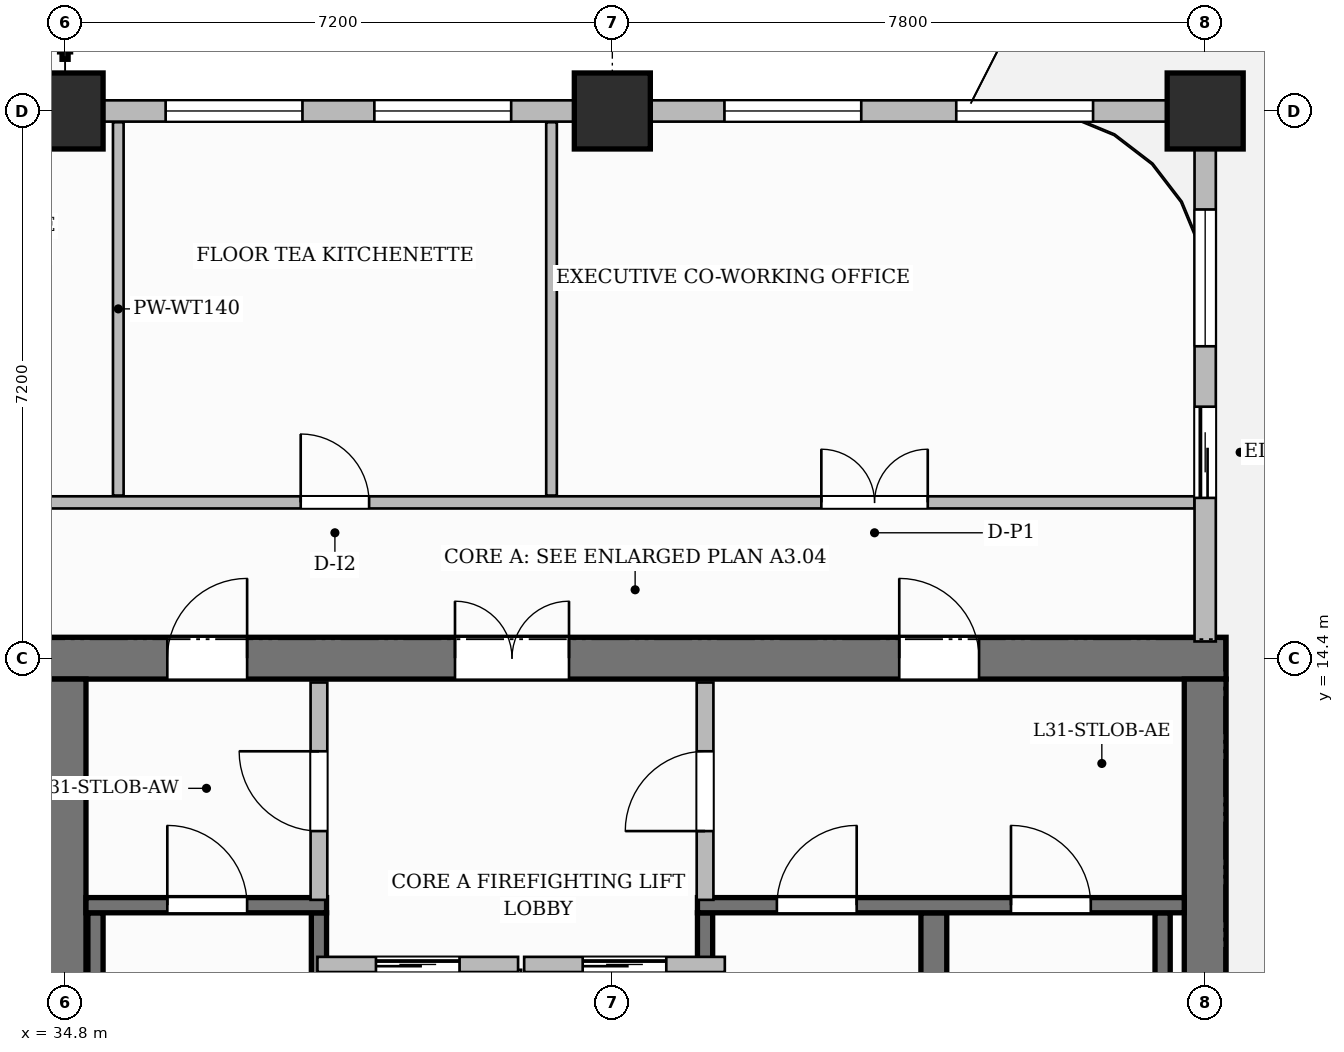
"""IFC4 building model, lengths in metres.
Left out: names, types, materials, properties, quantities, classifications, styles, units other than length and angle.
Written with IfcOpenShell. Run it as: python <this file> out.ifc"""

import sys

from ifc_helpers import new_model, si_unit, direction, frame, frame_2d, origin, origin_2d, place, context, subcontext, project, spatial, rectangle, extrude, source, transform, mapped, element, fill, save


model = new_model("IFC4")
c1 = context("Model", 3, precision=1e-05, world=origin(), true_north=direction((0.0, 1.0)))
c2 = subcontext(c1, "Body", "Model", "MODEL_VIEW")
j1 = project(units=[si_unit("LENGTHUNIT", "METRE"), si_unit("PLANEANGLEUNIT", "RADIAN")], contexts=[c1])
p1 = place(None, origin())
s1 = spatial("IfcSite", under=j1, at=p1, CompositionType="ELEMENT")
p2 = place(p1, origin())
s2 = spatial("IfcBuilding", under=s1, at=p2, CompositionType="ELEMENT")
p3 = place(p2, frame((0.0, 0.0, 126.6)))
s3 = spatial("IfcBuildingStorey", under=s2, at=p3, CompositionType="ELEMENT", Elevation=126.6)
p4 = place(p3, frame((34.525, 14.4, 0.0), z_axis=(0.0, 0.0, 1.0), x_axis=(1.0, 0.0, 0.0)))
e1 = element("IfcWall", 1, at=p4, inside=s3, PredefinedType="SHEAR", context=c2, shape_type="SweptSolid", body=[
    extrude(rectangle(XDim=15.55, YDim=0.55, at=frame_2d((7.775, 0.0))), origin(), (0.0, 0.0, 1.0), 3.7),
])
p5 = place(p4, frame((5.405, 0.0, 0.0)))
e2 = element("IfcOpeningElement", 2, at=p5, cuts=e1, PredefinedType="OPENING", context=c2, shape_type="SweptSolid", body=[
    extrude(rectangle(XDim=1.5, YDim=2.2, at=frame_2d((0.75, 1.1))), frame((0.0, 0.285, 0.0), z_axis=(0.0, -1.0, 0.0), x_axis=(1.0, 0.0, 0.0)), (0.0, 0.0, 1.0), 0.57),
])
p6 = place(p4, frame((1.62, 0.0, 0.0)))
e3 = element("IfcOpeningElement", 3, at=p6, cuts=e1, PredefinedType="OPENING", context=c2, shape_type="SweptSolid", body=[
    extrude(rectangle(XDim=1.05, YDim=2.15, at=frame_2d((0.525, 1.075))), frame((0.0, 0.285, 0.0), z_axis=(0.0, -1.0, 0.0), x_axis=(1.0, 0.0, 0.0)), (0.0, 0.0, 1.0), 0.57),
])
p7 = place(p4, frame((11.25, 0.0, 0.0)))
e4 = element("IfcOpeningElement", 4, at=p7, cuts=e1, PredefinedType="OPENING", context=c2, shape_type="SweptSolid", body=[
    extrude(rectangle(XDim=1.05, YDim=2.15, at=frame_2d((0.525, 1.075))), frame((0.0, 0.285, 0.0), z_axis=(0.0, -1.0, 0.0), x_axis=(1.0, 0.0, 0.0)), (0.0, 0.0, 1.0), 0.57),
])
for number, where, z_axis, x_axis in (
    (5, (34.8, 3.875, 0.0), (0.0, 0.0, 1.0), (0.0, 1.0, 0.0)),
    (6, (49.8, 3.875, 0.0), (0.0, 0.0, 1.0), (0.0, 1.0, 0.0)),
):
    element("IfcWall", number, at=place(p3, frame(where, z_axis=z_axis, x_axis=x_axis)), inside=s3, PredefinedType="SHEAR", context=c2, shape_type="SweptSolid", body=[
        extrude(rectangle(XDim=10.25, YDim=0.55, at=frame_2d((5.125, 0.0))), origin(), (0.0, 0.0, 1.0), 3.7),
    ])
m1 = source(origin(), c2, "Body", "SweptSolid", [
    extrude(rectangle(XDim=1.0, YDim=1.0, at=origin_2d()), origin(), (0.0, 0.0, 1.0), 3.7),
])
for number, where, z_axis, x_axis in (
    (7, (34.8, 21.6, 0.0), (0.0, 0.0, 1.0), (1.0, 0.0, 0.0)),
    (8, (42.0, 21.6, 0.0), (0.0, 0.0, 1.0), (1.0, 0.0, 0.0)),
    (9, (49.8, 21.6, 0.0), (0.0, 0.0, 1.0), (1.0, 0.0, 0.0)),
):
    element("IfcColumn", number, at=place(p3, frame(where, z_axis=z_axis, x_axis=x_axis)), inside=s3, PredefinedType="COLUMN", context=c2, shape_type="MappedRepresentation", body=[
        mapped(m1, transform((0.0, 0.0, 0.0), scale=1.0)),
    ])
for number, where, z_axis, x_axis in (
    (10, (35.2, 4.1, 0.0), (0.0, 0.0, 1.0), (0.0, 1.0, 0.0)),
    (11, (38.14, 4.1, 0.0), (0.0, 0.0, 1.0), (0.0, 1.0, 0.0)),
):
    element("IfcWall", number, at=place(p3, frame(where, z_axis=z_axis, x_axis=x_axis)), inside=s3, PredefinedType="SHEAR", context=c2, shape_type="SweptSolid", body=[
        extrude(rectangle(XDim=6.95, YDim=0.2, at=frame_2d((3.475, 0.0))), origin(), (0.0, 0.0, 1.0), 3.7),
    ])
p8 = place(p3, frame((35.075, 11.15, 0.0), z_axis=(0.0, 0.0, 1.0), x_axis=(1.0, 0.0, 0.0)))
e12 = element("IfcWall", 12, at=p8, inside=s3, PredefinedType="SHEAR", context=c2, shape_type="SweptSolid", body=[
    extrude(rectangle(XDim=3.165, YDim=0.2, at=frame_2d((1.583, 0.0))), origin(), (0.0, 0.0, 1.0), 3.7),
])
p9 = place(p8, frame((1.07, 0.0, 0.0)))
e13 = element("IfcOpeningElement", 13, at=p9, cuts=e12, PredefinedType="OPENING", context=c2, shape_type="SweptSolid", body=[
    extrude(rectangle(XDim=1.05, YDim=2.2, at=frame_2d((0.525, 1.1))), frame((0.0, 0.11, 0.0), z_axis=(0.0, -1.0, 0.0), x_axis=(1.0, 0.0, 0.0)), (0.0, 0.0, 1.0), 0.22),
])
p10 = place(p3, frame((43.22, 4.1, 0.0), z_axis=(0.0, 0.0, 1.0), x_axis=(0.0, 1.0, 0.0)))
e14 = element("IfcWall", 14, at=p10, inside=s3, PredefinedType="SHEAR", context=c2, shape_type="SweptSolid", body=[
    extrude(rectangle(XDim=6.95, YDim=0.2, at=frame_2d((3.475, 0.0))), origin(), (0.0, 0.0, 1.0), 3.7),
])
p11 = place(p3, frame((46.23, 4.1, 0.0), z_axis=(0.0, 0.0, 1.0), x_axis=(0.0, 1.0, 0.0)))
e15 = element("IfcWall", 15, at=p11, inside=s3, PredefinedType="SHEAR", context=c2, shape_type="SweptSolid", body=[
    extrude(rectangle(XDim=6.95, YDim=0.34, at=frame_2d((3.475, 0.0))), origin(), (0.0, 0.0, 1.0), 3.7),
])
p12 = place(p3, frame((49.24, 4.1, 0.0), z_axis=(0.0, 0.0, 1.0), x_axis=(0.0, 1.0, 0.0)))
e16 = element("IfcWall", 16, at=p12, inside=s3, PredefinedType="SHEAR", context=c2, shape_type="SweptSolid", body=[
    extrude(rectangle(XDim=6.95, YDim=0.2, at=frame_2d((3.475, 0.0))), origin(), (0.0, 0.0, 1.0), 3.7),
])
p13 = place(p3, frame((43.12, 11.15, 0.0), z_axis=(0.0, 0.0, 1.0), x_axis=(1.0, 0.0, 0.0)))
e17 = element("IfcWall", 17, at=p13, inside=s3, PredefinedType="SHEAR", context=c2, shape_type="SweptSolid", body=[
    extrude(rectangle(XDim=6.405, YDim=0.2, at=frame_2d((3.202, 0.0))), origin(), (0.0, 0.0, 1.0), 3.7),
])
p14 = place(p13, frame((1.045, 0.0, 0.0)))
e18 = element("IfcOpeningElement", 18, at=p14, cuts=e17, PredefinedType="OPENING", context=c2, shape_type="SweptSolid", body=[
    extrude(rectangle(XDim=1.05, YDim=2.2, at=frame_2d((0.525, 1.1))), frame((0.0, 0.11, 0.0), z_axis=(0.0, -1.0, 0.0), x_axis=(1.0, 0.0, 0.0)), (0.0, 0.0, 1.0), 0.22),
])
p15 = place(p13, frame((4.125, 0.0, 0.0)))
e19 = element("IfcOpeningElement", 19, at=p15, cuts=e17, PredefinedType="OPENING", context=c2, shape_type="SweptSolid", body=[
    extrude(rectangle(XDim=1.05, YDim=2.2, at=frame_2d((0.525, 1.1))), frame((0.0, 0.11, 0.0), z_axis=(0.0, -1.0, 0.0), x_axis=(1.0, 0.0, 0.0)), (0.0, 0.0, 1.0), 0.22),
])
p16 = place(p3, frame((40.7, 8.12, 0.0), z_axis=(0.0, 0.0, 1.0), x_axis=(0.0, 1.0, 0.0)))
e20 = element("IfcWall", 20, at=p16, inside=s3, PredefinedType="PARTITIONING", context=c2, shape_type="SweptSolid", body=[
    extrude(rectangle(XDim=2.18, YDim=0.2, at=frame_2d((1.09, 0.0))), origin(), (0.0, 0.0, 1.0), 3.45),
])
p17 = place(p3, frame((38.14, 11.22, 0.0), z_axis=(0.0, 0.0, 1.0), x_axis=(0.0, 1.0, 0.0)))
e21 = element("IfcWall", 21, at=p17, inside=s3, PredefinedType="PARTITIONING", context=c2, shape_type="SweptSolid", body=[
    extrude(rectangle(XDim=2.86, YDim=0.22, at=frame_2d((1.43, 0.0))), origin(), (0.0, 0.0, 1.0), 3.45),
])
p18 = place(p17, frame((0.905, 0.0, 0.0)))
e22 = element("IfcOpeningElement", 22, at=p18, cuts=e21, PredefinedType="OPENING", context=c2, shape_type="SweptSolid", body=[
    extrude(rectangle(XDim=1.05, YDim=2.15, at=frame_2d((0.525, 1.075))), frame((0.0, 0.12, 0.0), z_axis=(0.0, -1.0, 0.0), x_axis=(1.0, 0.0, 0.0)), (0.0, 0.0, 1.0), 0.24),
])
p19 = place(p3, frame((43.22, 11.22, 0.0), z_axis=(0.0, 0.0, 1.0), x_axis=(0.0, 1.0, 0.0)))
e23 = element("IfcWall", 23, at=p19, inside=s3, PredefinedType="PARTITIONING", context=c2, shape_type="SweptSolid", body=[
    extrude(rectangle(XDim=2.86, YDim=0.22, at=frame_2d((1.43, 0.0))), origin(), (0.0, 0.0, 1.0), 3.45),
])
p20 = place(p19, frame((0.905, 0.0, 0.0)))
e24 = element("IfcOpeningElement", 24, at=p20, cuts=e23, PredefinedType="OPENING", context=c2, shape_type="SweptSolid", body=[
    extrude(rectangle(XDim=1.05, YDim=2.15, at=frame_2d((0.525, 1.075))), frame((0.0, 0.12, 0.0), z_axis=(0.0, -1.0, 0.0), x_axis=(1.0, 0.0, 0.0)), (0.0, 0.0, 1.0), 0.24),
])
p21 = place(p3, frame((32.19, 16.45, 0.0), z_axis=(0.0, 0.0, 1.0), x_axis=(1.0, 0.0, 0.0)))
e25 = element("IfcWall", 25, at=p21, inside=s3, PredefinedType="PARTITIONING", context=c2, shape_type="SweptSolid", body=[
    extrude(rectangle(XDim=17.47, YDim=0.16, at=frame_2d((8.735, 0.0))), origin(), (0.0, 0.0, 1.0), 3.45),
])
p22 = place(p21, frame((1.185, 0.0, 0.0)))
e26 = element("IfcOpeningElement", 26, at=p22, cuts=e25, PredefinedType="OPENING", context=c2, shape_type="SweptSolid", body=[
    extrude(rectangle(XDim=0.85, YDim=2.1, at=frame_2d((0.425, 1.05))), frame((0.0, 0.09, 0.0), z_axis=(0.0, -1.0, 0.0), x_axis=(1.0, 0.0, 0.0)), (0.0, 0.0, 1.0), 0.18),
])
p23 = place(p21, frame((5.71, 0.0, 0.0)))
e27 = element("IfcOpeningElement", 27, at=p23, cuts=e25, PredefinedType="OPENING", context=c2, shape_type="SweptSolid", body=[
    extrude(rectangle(XDim=0.9, YDim=2.15, at=frame_2d((0.45, 1.075))), frame((0.0, 0.09, 0.0), z_axis=(0.0, -1.0, 0.0), x_axis=(1.0, 0.0, 0.0)), (0.0, 0.0, 1.0), 0.18),
])
p24 = place(p21, frame((12.56, 0.0, 0.0)))
e28 = element("IfcOpeningElement", 28, at=p24, cuts=e25, PredefinedType="OPENING", context=c2, shape_type="SweptSolid", body=[
    extrude(rectangle(XDim=1.4, YDim=2.35, at=frame_2d((0.7, 1.175))), frame((0.0, 0.09, 0.0), z_axis=(0.0, -1.0, 0.0), x_axis=(1.0, 0.0, 0.0)), (0.0, 0.0, 1.0), 0.18),
])
for number, where, z_axis, x_axis in (
    (29, (35.5, 16.54, 0.0), (0.0, 0.0, 1.0), (0.0, 1.0, 0.0)),
    (30, (41.2, 16.54, 0.0), (0.0, 0.0, 1.0), (0.0, 1.0, 0.0)),
):
    element("IfcWall", number, at=place(p3, frame(where, z_axis=z_axis, x_axis=x_axis)), inside=s3, PredefinedType="PARTITIONING", context=c2, shape_type="SweptSolid", body=[
        extrude(rectangle(XDim=4.912, YDim=0.14, at=frame_2d((2.456, 0.0))), origin(), (0.0, 0.0, 1.0), 3.45),
    ])
p25 = place(p3, frame((38.12, 10.37, 0.0), z_axis=(0.0, 0.0, 1.0), x_axis=(1.0, 0.0, 0.0)))
e31 = element("IfcWall", 31, at=p25, inside=s3, PredefinedType="PARTITIONING", context=c2, shape_type="SweptSolid", body=[
    extrude(rectangle(XDim=2.64, YDim=0.2, at=frame_2d((1.32, 0.0))), origin(), (0.0, 0.0, 1.0), 3.45),
])
p26 = place(p25, frame((0.77, 0.0, 0.0)))
e32 = element("IfcOpeningElement", 32, at=p26, cuts=e31, PredefinedType="OPENING", context=c2, shape_type="SweptSolid", body=[
    extrude(rectangle(XDim=1.1, YDim=2.2, at=frame_2d((0.55, 1.1))), frame((0.0, 0.11, 0.0), z_axis=(0.0, -1.0, 0.0), x_axis=(1.0, 0.0, 0.0)), (0.0, 0.0, 1.0), 0.22),
])
p27 = place(p3, frame((40.84, 10.37, 0.0), z_axis=(0.0, 0.0, 1.0), x_axis=(1.0, 0.0, 0.0)))
e33 = element("IfcWall", 33, at=p27, inside=s3, PredefinedType="PARTITIONING", context=c2, shape_type="SweptSolid", body=[
    extrude(rectangle(XDim=2.64, YDim=0.2, at=frame_2d((1.32, 0.0))), origin(), (0.0, 0.0, 1.0), 3.45),
])
p28 = place(p27, frame((0.77, 0.0, 0.0)))
e34 = element("IfcOpeningElement", 34, at=p28, cuts=e33, PredefinedType="OPENING", context=c2, shape_type="SweptSolid", body=[
    extrude(rectangle(XDim=1.1, YDim=2.2, at=frame_2d((0.55, 1.1))), frame((0.0, 0.11, 0.0), z_axis=(0.0, -1.0, 0.0), x_axis=(1.0, 0.0, 0.0)), (0.0, 0.0, 1.0), 0.22),
])
p29 = place(p3, frame((49.8, 14.62, 0.0), z_axis=(0.0, 0.0, 1.0), x_axis=(0.0, 1.0, 0.0)))
e35 = element("IfcWall", 35, at=p29, inside=s3, PredefinedType="SOLIDWALL", context=c2, shape_type="SweptSolid", body=[
    extrude(rectangle(XDim=6.93, YDim=0.28, at=frame_2d((3.465, 0.0))), origin(), (0.0, 0.0, 1.0), 2.935),
])
p30 = place(p29, frame((1.889, 0.0, 0.0)))
e36 = element("IfcOpeningElement", 36, at=p30, cuts=e35, PredefinedType="OPENING", context=c2, shape_type="SweptSolid", body=[
    extrude(rectangle(XDim=1.2, YDim=2.2, at=frame_2d((0.6, 1.1))), frame((0.0, 0.15, 0.0), z_axis=(0.0, -1.0, 0.0), x_axis=(1.0, 0.0, 0.0)), (0.0, 0.0, 1.0), 0.3),
])
p31 = place(p29, frame((3.884, 0.0, 0.8)))
e37 = element("IfcOpeningElement", 37, at=p31, cuts=e35, PredefinedType="OPENING", context=c2, shape_type="SweptSolid", body=[
    extrude(rectangle(XDim=1.8, YDim=1.85, at=frame_2d((0.9, 0.925))), frame((0.0, 0.15, 0.0), z_axis=(0.0, -1.0, 0.0), x_axis=(1.0, 0.0, 0.0)), (0.0, 0.0, 1.0), 0.3),
])
p32 = place(p3, frame((34.8, 21.6, 0.0), z_axis=(0.0, 0.0, 1.0), x_axis=(1.0, 0.0, 0.0)))
e38 = element("IfcWall", 38, at=p32, inside=s3, PredefinedType="SOLIDWALL", context=c2, shape_type="SweptSolid", body=[
    extrude(rectangle(XDim=15.0, YDim=0.28, at=frame_2d((7.5, 0.0))), origin(), (0.0, 0.0, 1.0), 2.935),
])
p33 = place(p32, frame((1.323, 0.0, 0.8)))
e39 = element("IfcOpeningElement", 39, at=p33, cuts=e38, PredefinedType="OPENING", context=c2, shape_type="SweptSolid", body=[
    extrude(rectangle(XDim=1.8, YDim=1.85, at=frame_2d((0.9, 0.925))), frame((0.0, 0.15, 0.0), z_axis=(0.0, -1.0, 0.0), x_axis=(1.0, 0.0, 0.0)), (0.0, 0.0, 1.0), 0.3),
])
p34 = place(p32, frame((4.069, 0.0, 0.8)))
e40 = element("IfcOpeningElement", 40, at=p34, cuts=e38, PredefinedType="OPENING", context=c2, shape_type="SweptSolid", body=[
    extrude(rectangle(XDim=1.8, YDim=1.85, at=frame_2d((0.9, 0.925))), frame((0.0, 0.15, 0.0), z_axis=(0.0, -1.0, 0.0), x_axis=(1.0, 0.0, 0.0)), (0.0, 0.0, 1.0), 0.3),
])
p35 = place(p32, frame((8.675, 0.0, 0.8)))
e41 = element("IfcOpeningElement", 41, at=p35, cuts=e38, PredefinedType="OPENING", context=c2, shape_type="SweptSolid", body=[
    extrude(rectangle(XDim=1.8, YDim=1.85, at=frame_2d((0.9, 0.925))), frame((0.0, 0.15, 0.0), z_axis=(0.0, -1.0, 0.0), x_axis=(1.0, 0.0, 0.0)), (0.0, 0.0, 1.0), 0.3),
])
p36 = place(p32, frame((11.725, 0.0, 0.8)))
e42 = element("IfcOpeningElement", 42, at=p36, cuts=e38, PredefinedType="OPENING", context=c2, shape_type="SweptSolid", body=[
    extrude(rectangle(XDim=1.8, YDim=1.85, at=frame_2d((0.9, 0.925))), frame((0.0, 0.15, 0.0), z_axis=(0.0, -1.0, 0.0), x_axis=(1.0, 0.0, 0.0)), (0.0, 0.0, 1.0), 0.3),
])
m2 = source(origin(), c2, "Body", "SweptSolid", [
    extrude(rectangle(XDim=1.05, YDim=2.2, at=frame_2d((0.525, 1.1))), frame((0.0, 0.025, 0.0), z_axis=(0.0, -1.0, 0.0), x_axis=(1.0, 0.0, 0.0)), (0.0, 0.0, 1.0), 0.05),
])
p37 = place(p9, origin())
e43 = element("IfcDoor", 43, at=p37, inside=s3, OperationType="SINGLE_SWING_LEFT", PredefinedType="DOOR", context=c2, shape_type="MappedRepresentation", body=[
    mapped(m2, transform((0.0, 0.0, 0.0), scale=1.0)),
])
fill(e13, e43)
p38 = place(p14, origin())
e44 = element("IfcDoor", 44, at=p38, inside=s3, OperationType="SINGLE_SWING_RIGHT", PredefinedType="DOOR", context=c2, shape_type="MappedRepresentation", body=[
    mapped(m2, transform((0.0, 0.0, 0.0), scale=1.0)),
])
fill(e18, e44)
p39 = place(p15, origin())
e45 = element("IfcDoor", 45, at=p39, inside=s3, OperationType="SINGLE_SWING_LEFT", PredefinedType="DOOR", context=c2, shape_type="MappedRepresentation", body=[
    mapped(m2, transform((0.0, 0.0, 0.0), scale=1.0)),
])
fill(e19, e45)
m3 = source(origin(), c2, "Body", "SweptSolid", [
    extrude(rectangle(XDim=1.05, YDim=2.15, at=frame_2d((0.525, 1.075))), frame((0.0, 0.025, 0.0), z_axis=(0.0, -1.0, 0.0), x_axis=(1.0, 0.0, 0.0)), (0.0, 0.0, 1.0), 0.05),
])
p40 = place(p18, origin())
e46 = element("IfcDoor", 46, at=p40, inside=s3, OperationType="SINGLE_SWING_RIGHT", PredefinedType="DOOR", context=c2, shape_type="MappedRepresentation", body=[
    mapped(m3, transform((0.0, 0.0, 0.0), scale=1.0)),
])
fill(e22, e46)
p41 = place(p20, origin())
e47 = element("IfcDoor", 47, at=p41, inside=s3, OperationType="SINGLE_SWING_LEFT", PredefinedType="DOOR", context=c2, shape_type="MappedRepresentation", body=[
    mapped(m3, transform((0.0, 0.0, 0.0), scale=1.0)),
])
fill(e24, e47)
m4 = source(origin(), c2, "Body", "SweptSolid", [
    extrude(rectangle(XDim=1.5, YDim=2.2, at=frame_2d((0.75, 1.1))), frame((0.0, 0.025, 0.0), z_axis=(0.0, -1.0, 0.0), x_axis=(1.0, 0.0, 0.0)), (0.0, 0.0, 1.0), 0.05),
])
p42 = place(p5, origin())
e48 = element("IfcDoor", 48, at=p42, inside=s3, OperationType="DOUBLE_DOOR_SINGLE_SWING", PredefinedType="DOOR", context=c2, shape_type="MappedRepresentation", body=[
    mapped(m4, transform((0.0, 0.0, 0.0), scale=1.0)),
])
fill(e2, e48)
p43 = place(p6, origin())
e49 = element("IfcDoor", 49, at=p43, inside=s3, OperationType="SINGLE_SWING_RIGHT", PredefinedType="DOOR", context=c2, shape_type="MappedRepresentation", body=[
    mapped(m3, transform((0.0, 0.0, 0.0), scale=1.0)),
])
fill(e3, e49)
p44 = place(p7, origin())
e50 = element("IfcDoor", 50, at=p44, inside=s3, OperationType="SINGLE_SWING_LEFT", PredefinedType="DOOR", context=c2, shape_type="MappedRepresentation", body=[
    mapped(m3, transform((0.0, 0.0, 0.0), scale=1.0)),
])
fill(e4, e50)
m5 = source(origin(), c2, "Body", "SweptSolid", [
    extrude(rectangle(XDim=0.9, YDim=2.15, at=frame_2d((0.45, 1.075))), frame((0.0, 0.025, 0.0), z_axis=(0.0, -1.0, 0.0), x_axis=(1.0, 0.0, 0.0)), (0.0, 0.0, 1.0), 0.05),
])
p45 = place(p23, origin())
e51 = element("IfcDoor", 51, at=p45, inside=s3, OperationType="SINGLE_SWING_LEFT", PredefinedType="DOOR", context=c2, shape_type="MappedRepresentation", body=[
    mapped(m5, transform((0.0, 0.0, 0.0), scale=1.0)),
])
fill(e27, e51)
m6 = source(origin(), c2, "Body", "SweptSolid", [
    extrude(rectangle(XDim=1.4, YDim=2.35, at=frame_2d((0.7, 1.175))), frame((0.0, 0.025, 0.0), z_axis=(0.0, -1.0, 0.0), x_axis=(1.0, 0.0, 0.0)), (0.0, 0.0, 1.0), 0.05),
])
p46 = place(p24, origin())
e52 = element("IfcDoor", 52, at=p46, inside=s3, OperationType="DOUBLE_DOOR_SINGLE_SWING", PredefinedType="DOOR", context=c2, shape_type="MappedRepresentation", body=[
    mapped(m6, transform((0.0, 0.0, 0.0), scale=1.0)),
])
fill(e28, e52)
m7 = source(origin(), c2, "Body", "SweptSolid", [
    extrude(rectangle(XDim=1.1, YDim=2.2, at=frame_2d((0.55, 1.1))), frame((0.0, 0.025, 0.0), z_axis=(0.0, -1.0, 0.0), x_axis=(1.0, 0.0, 0.0)), (0.0, 0.0, 1.0), 0.05),
])
p47 = place(p26, origin())
e53 = element("IfcDoor", 53, at=p47, inside=s3, OperationType="SLIDING_TO_LEFT", PredefinedType="DOOR", context=c2, shape_type="MappedRepresentation", body=[
    mapped(m7, transform((0.0, 0.0, 0.0), scale=1.0)),
])
fill(e32, e53)
p48 = place(p28, origin())
e54 = element("IfcDoor", 54, at=p48, inside=s3, OperationType="SLIDING_TO_LEFT", PredefinedType="DOOR", context=c2, shape_type="MappedRepresentation", body=[
    mapped(m7, transform((0.0, 0.0, 0.0), scale=1.0)),
])
fill(e34, e54)
m8 = source(origin(), c2, "Body", "SweptSolid", [
    extrude(rectangle(XDim=1.2, YDim=2.2, at=frame_2d((0.6, 1.1))), frame((0.0, 0.025, 0.0), z_axis=(0.0, -1.0, 0.0), x_axis=(1.0, 0.0, 0.0)), (0.0, 0.0, 1.0), 0.05),
])
p49 = place(p30, origin())
e55 = element("IfcDoor", 55, at=p49, inside=s3, OperationType="SLIDING_TO_LEFT", PredefinedType="DOOR", context=c2, shape_type="MappedRepresentation", body=[
    mapped(m8, transform((0.0, 0.0, 0.0), scale=1.0)),
])
fill(e36, e55)
m9 = source(origin(), c2, "Body", "SweptSolid", [
    extrude(rectangle(XDim=1.8, YDim=1.85, at=frame_2d((0.9, 0.925))), frame((0.0, 0.03, 0.0), z_axis=(0.0, -1.0, 0.0), x_axis=(1.0, 0.0, 0.0)), (0.0, 0.0, 1.0), 0.06),
])
p50 = place(p31, origin())
e56 = element("IfcWindow", 56, at=p50, inside=s3, PartitioningType="DOUBLE_PANEL_VERTICAL", PredefinedType="WINDOW", context=c2, shape_type="MappedRepresentation", body=[
    mapped(m9, transform((0.0, 0.0, 0.0), scale=1.0)),
])
fill(e37, e56)
p51 = place(p33, origin())
e57 = element("IfcWindow", 57, at=p51, inside=s3, PartitioningType="DOUBLE_PANEL_VERTICAL", PredefinedType="WINDOW", context=c2, shape_type="MappedRepresentation", body=[
    mapped(m9, transform((0.0, 0.0, 0.0), scale=1.0)),
])
fill(e39, e57)
p52 = place(p34, origin())
e58 = element("IfcWindow", 58, at=p52, inside=s3, PartitioningType="DOUBLE_PANEL_VERTICAL", PredefinedType="WINDOW", context=c2, shape_type="MappedRepresentation", body=[
    mapped(m9, transform((0.0, 0.0, 0.0), scale=1.0)),
])
fill(e40, e58)
p53 = place(p35, origin())
e59 = element("IfcWindow", 59, at=p53, inside=s3, PartitioningType="DOUBLE_PANEL_VERTICAL", PredefinedType="WINDOW", context=c2, shape_type="MappedRepresentation", body=[
    mapped(m9, transform((0.0, 0.0, 0.0), scale=1.0)),
])
fill(e41, e59)
p54 = place(p36, origin())
e60 = element("IfcWindow", 60, at=p54, inside=s3, PartitioningType="DOUBLE_PANEL_VERTICAL", PredefinedType="WINDOW", context=c2, shape_type="MappedRepresentation", body=[
    mapped(m9, transform((0.0, 0.0, 0.0), scale=1.0)),
])
fill(e42, e60)
save(model, sys.argv[1])
